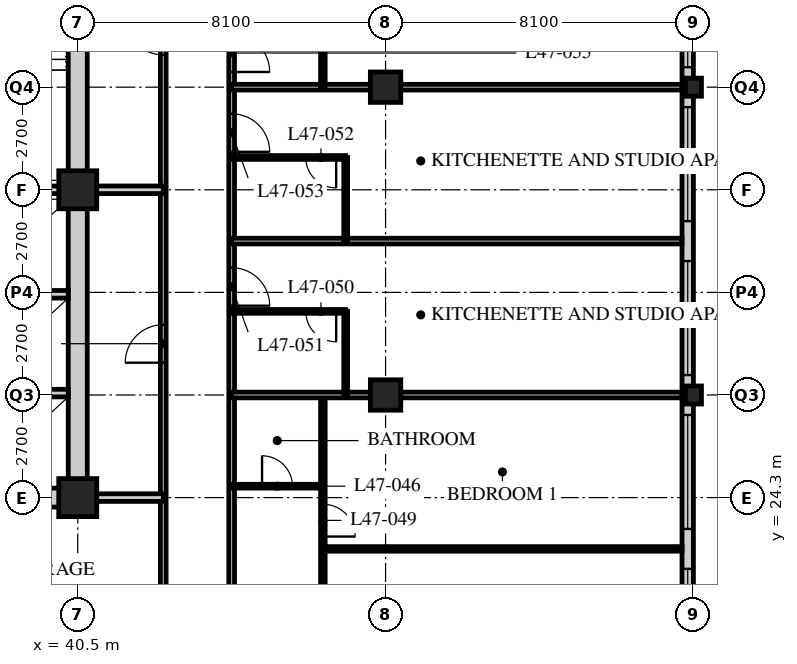
"""IFC4 building model, lengths in metres.
Left out: names, types, materials, properties, quantities, classifications, styles, units other than length and angle.
Written with IfcOpenShell. Run it as: python <this file> out.ifc"""

import sys

from ifc_helpers import new_model, si_unit, direction, frame, frame_2d, origin, origin_2d, place, context, subcontext, project, spatial, rectangle, hollow_rectangle, i_section, extrude, element, fill, save


model = new_model("IFC4")
c1 = context("Model", 3, precision=1e-05, world=origin(), true_north=direction((0.0, 1.0)))
c2 = subcontext(c1, "Body", "Model", "MODEL_VIEW")
j1 = project(units=[si_unit("LENGTHUNIT", "METRE"), si_unit("PLANEANGLEUNIT", "RADIAN")], contexts=[c1])
p1 = place(None, origin())
s1 = spatial("IfcSite", under=j1, at=p1, CompositionType="ELEMENT")
p2 = place(p1, origin())
s2 = spatial("IfcBuilding", under=s1, at=p2, CompositionType="ELEMENT")
p3 = place(p2, frame((0.0, 0.0, 184.8)))
s3 = spatial("IfcBuildingStorey", under=s2, at=p3, CompositionType="ELEMENT", Elevation=184.8)
for number, where, z_axis, x_axis in (
    (1, (40.5, 24.3, 0.0), (0.0, 0.0, 1.0), (1.0, 0.0, 0.0)),
    (2, (40.5, 32.4, 0.0), (0.0, 0.0, 1.0), (1.0, 0.0, 0.0)),
):
    element("IfcColumn", number, at=place(p3, frame(where, z_axis=z_axis, x_axis=x_axis)), inside=s3, PredefinedType="COLUMN", context=c2, shape_type="SweptSolid", body=[
        extrude(hollow_rectangle(XDim=1.0, YDim=1.0, WallThickness=0.1, at=origin_2d()), origin(), (0.0, 0.0, 1.0), 3.6),
    ])
for number, where, z_axis, x_axis in (
    (3, (48.6, 27.0, 0.0), (0.0, 0.0, 1.0), (1.0, 0.0, 0.0)),
    (4, (48.6, 35.1, 0.0), (0.0, 0.0, 1.0), (1.0, 0.0, 0.0)),
):
    element("IfcColumn", number, at=place(p3, frame(where, z_axis=z_axis, x_axis=x_axis)), inside=s3, PredefinedType="COLUMN", context=c2, shape_type="SweptSolid", body=[
        extrude(hollow_rectangle(XDim=0.8, YDim=0.8, WallThickness=0.08, at=origin_2d()), origin(), (0.0, 0.0, 1.0), 3.6),
    ])
for number, where, z_axis, x_axis in (
    (5, (56.7, 27.0, 0.0), (0.0, 0.0, 1.0), (1.0, 0.0, 0.0)),
    (6, (56.7, 35.1, 0.0), (0.0, 0.0, 1.0), (1.0, 0.0, 0.0)),
):
    element("IfcColumn", number, at=place(p3, frame(where, z_axis=z_axis, x_axis=x_axis)), inside=s3, PredefinedType="COLUMN", context=c2, shape_type="SweptSolid", body=[
        extrude(i_section(OverallWidth=0.424, OverallDepth=0.475, WebThickness=0.048, FlangeThickness=0.077, FilletRadius=0.015, at=origin_2d()), origin(), (0.0, 0.0, 1.0), 3.6),
    ])
p4 = place(p3, frame((56.55, 19.2, 0.0), z_axis=(0.0, 0.0, 1.0), x_axis=(0.0, 1.0, 0.0)))
e7 = element("IfcWall", 7, at=p4, inside=s3, PredefinedType="SOLIDWALL", context=c2, shape_type="SweptSolid", body=[
    extrude(rectangle(XDim=32.1, YDim=0.3, at=frame_2d((16.05, 0.0))), origin(), (0.0, 0.0, 1.0), 3.39),
])
p5 = place(p4, frame((0.225, 0.0, 0.6)))
e8 = element("IfcOpeningElement", 8, at=p5, cuts=e7, PredefinedType="OPENING", context=c2, shape_type="SweptSolid", body=[
    extrude(rectangle(XDim=3.0, YDim=2.4, at=frame_2d((1.5, 1.2))), frame((0.0, 0.16, 0.0), z_axis=(0.0, -1.0, 0.0), x_axis=(1.0, 0.0, 0.0)), (0.0, 0.0, 1.0), 0.32),
])
p6 = place(p4, frame((4.275, 0.0, 0.6)))
e9 = element("IfcOpeningElement", 9, at=p6, cuts=e7, PredefinedType="OPENING", context=c2, shape_type="SweptSolid", body=[
    extrude(rectangle(XDim=3.0, YDim=2.4, at=frame_2d((1.5, 1.2))), frame((0.0, 0.16, 0.0), z_axis=(0.0, -1.0, 0.0), x_axis=(1.0, 0.0, 0.0)), (0.0, 0.0, 1.0), 0.32),
])
p7 = place(p4, frame((8.325, 0.0, 0.6)))
e10 = element("IfcOpeningElement", 10, at=p7, cuts=e7, PredefinedType="OPENING", context=c2, shape_type="SweptSolid", body=[
    extrude(rectangle(XDim=3.0, YDim=2.4, at=frame_2d((1.5, 1.2))), frame((0.0, 0.16, 0.0), z_axis=(0.0, -1.0, 0.0), x_axis=(1.0, 0.0, 0.0)), (0.0, 0.0, 1.0), 0.32),
])
p8 = place(p4, frame((12.375, 0.0, 0.6)))
e11 = element("IfcOpeningElement", 11, at=p8, cuts=e7, PredefinedType="OPENING", context=c2, shape_type="SweptSolid", body=[
    extrude(rectangle(XDim=3.0, YDim=2.4, at=frame_2d((1.5, 1.2))), frame((0.0, 0.16, 0.0), z_axis=(0.0, -1.0, 0.0), x_axis=(1.0, 0.0, 0.0)), (0.0, 0.0, 1.0), 0.32),
])
p9 = place(p4, frame((16.425, 0.0, 0.6)))
e12 = element("IfcOpeningElement", 12, at=p9, cuts=e7, PredefinedType="OPENING", context=c2, shape_type="SweptSolid", body=[
    extrude(rectangle(XDim=3.0, YDim=2.4, at=frame_2d((1.5, 1.2))), frame((0.0, 0.16, 0.0), z_axis=(0.0, -1.0, 0.0), x_axis=(1.0, 0.0, 0.0)), (0.0, 0.0, 1.0), 0.32),
])
p10 = place(p4, frame((20.475, 0.0, 0.6)))
e13 = element("IfcOpeningElement", 13, at=p10, cuts=e7, PredefinedType="OPENING", context=c2, shape_type="SweptSolid", body=[
    extrude(rectangle(XDim=3.0, YDim=2.4, at=frame_2d((1.5, 1.2))), frame((0.0, 0.16, 0.0), z_axis=(0.0, -1.0, 0.0), x_axis=(1.0, 0.0, 0.0)), (0.0, 0.0, 1.0), 0.32),
])
p11 = place(p4, frame((24.525, 0.0, 0.6)))
e14 = element("IfcOpeningElement", 14, at=p11, cuts=e7, PredefinedType="OPENING", context=c2, shape_type="SweptSolid", body=[
    extrude(rectangle(XDim=3.0, YDim=2.4, at=frame_2d((1.5, 1.2))), frame((0.0, 0.16, 0.0), z_axis=(0.0, -1.0, 0.0), x_axis=(1.0, 0.0, 0.0)), (0.0, 0.0, 1.0), 0.32),
])
p12 = place(p4, frame((28.575, 0.0, 0.6)))
e15 = element("IfcOpeningElement", 15, at=p12, cuts=e7, PredefinedType="OPENING", context=c2, shape_type="SweptSolid", body=[
    extrude(rectangle(XDim=3.0, YDim=2.4, at=frame_2d((1.5, 1.2))), frame((0.0, 0.16, 0.0), z_axis=(0.0, -1.0, 0.0), x_axis=(1.0, 0.0, 0.0)), (0.0, 0.0, 1.0), 0.32),
])
p13 = place(p3, frame((44.55, 18.9, 0.0), z_axis=(0.0, 0.0, 1.0), x_axis=(0.0, 1.0, 0.0)))
e16 = element("IfcWall", 16, at=p13, inside=s3, PredefinedType="PARTITIONING", context=c2, shape_type="SweptSolid", body=[
    extrude(rectangle(XDim=28.35, YDim=0.15, at=frame_2d((14.175, 0.0))), origin(), (0.0, 0.0, 1.0), 3.39),
])
p14 = place(p13, frame((0.4, 0.0, 0.0)))
e17 = element("IfcOpeningElement", 17, at=p14, cuts=e16, PredefinedType="OPENING", context=c2, shape_type="SweptSolid", body=[
    extrude(rectangle(XDim=1.0, YDim=2.1, at=frame_2d((0.5, 1.05))), frame((0.0, 0.085, 0.0), z_axis=(0.0, -1.0, 0.0), x_axis=(1.0, 0.0, 0.0)), (0.0, 0.0, 1.0), 0.17),
])
p15 = place(p13, frame((10.45, 0.0, 0.0)))
e18 = element("IfcOpeningElement", 18, at=p15, cuts=e16, PredefinedType="OPENING", context=c2, shape_type="SweptSolid", body=[
    extrude(rectangle(XDim=1.0, YDim=2.1, at=frame_2d((0.5, 1.05))), frame((0.0, 0.085, 0.0), z_axis=(0.0, -1.0, 0.0), x_axis=(1.0, 0.0, 0.0)), (0.0, 0.0, 1.0), 0.17),
])
p16 = place(p13, frame((14.5, 0.0, 0.0)))
e19 = element("IfcOpeningElement", 19, at=p16, cuts=e16, PredefinedType="OPENING", context=c2, shape_type="SweptSolid", body=[
    extrude(rectangle(XDim=1.0, YDim=2.1, at=frame_2d((0.5, 1.05))), frame((0.0, 0.085, 0.0), z_axis=(0.0, -1.0, 0.0), x_axis=(1.0, 0.0, 0.0)), (0.0, 0.0, 1.0), 0.17),
])
p17 = place(p13, frame((16.6, 0.0, 0.0)))
e20 = element("IfcOpeningElement", 20, at=p17, cuts=e16, PredefinedType="OPENING", context=c2, shape_type="SweptSolid", body=[
    extrude(rectangle(XDim=1.0, YDim=2.1, at=frame_2d((0.5, 1.05))), frame((0.0, 0.085, 0.0), z_axis=(0.0, -1.0, 0.0), x_axis=(1.0, 0.0, 0.0)), (0.0, 0.0, 1.0), 0.17),
])
p18 = place(p13, frame((26.65, 0.0, 0.0)))
e21 = element("IfcOpeningElement", 21, at=p18, cuts=e16, PredefinedType="OPENING", context=c2, shape_type="SweptSolid", body=[
    extrude(rectangle(XDim=1.0, YDim=2.1, at=frame_2d((0.5, 1.05))), frame((0.0, 0.085, 0.0), z_axis=(0.0, -1.0, 0.0), x_axis=(1.0, 0.0, 0.0)), (0.0, 0.0, 1.0), 0.17),
])
p19 = place(p3, frame((42.75, 20.7, 0.0), z_axis=(0.0, 0.0, 1.0), x_axis=(0.0, 1.0, 0.0)))
e22 = element("IfcWall", 22, at=p19, inside=s3, PredefinedType="PARTITIONING", context=c2, shape_type="SweptSolid", body=[
    extrude(rectangle(XDim=24.75, YDim=0.15, at=frame_2d((12.375, 0.0))), origin(), (0.0, 0.0, 1.0), 3.39),
])
p20 = place(p19, frame((7.15, 0.0, 0.0)))
e23 = element("IfcOpeningElement", 23, at=p20, cuts=e22, PredefinedType="OPENING", context=c2, shape_type="SweptSolid", body=[
    extrude(rectangle(XDim=1.0, YDim=2.1, at=frame_2d((0.5, 1.05))), frame((0.0, 0.085, 0.0), z_axis=(0.0, -1.0, 0.0), x_axis=(1.0, 0.0, 0.0)), (0.0, 0.0, 1.0), 0.17),
])
p21 = place(p19, frame((15.25, 0.0, 0.0)))
e24 = element("IfcOpeningElement", 24, at=p21, cuts=e22, PredefinedType="OPENING", context=c2, shape_type="SweptSolid", body=[
    extrude(rectangle(XDim=1.0, YDim=2.1, at=frame_2d((0.5, 1.05))), frame((0.0, 0.085, 0.0), z_axis=(0.0, -1.0, 0.0), x_axis=(1.0, 0.0, 0.0)), (0.0, 0.0, 1.0), 0.17),
])
for number, where, z_axis, x_axis in (
    (25, (40.5, 32.4, 0.0), (0.0, 0.0, 1.0), (1.0, 0.0, 0.0)),
    (26, (40.5, 24.3, 0.0), (0.0, 0.0, 1.0), (1.0, 0.0, 0.0)),
):
    element("IfcWall", number, at=place(p3, frame(where, z_axis=z_axis, x_axis=x_axis)), inside=s3, PredefinedType="SOLIDWALL", context=c2, shape_type="SweptSolid", body=[
        extrude(rectangle(XDim=2.25, YDim=0.2, at=frame_2d((1.125, 0.0))), origin(), (0.0, 0.0, 1.0), 3.39),
    ])
p22 = place(p3, frame((46.95, 18.9, 0.0), z_axis=(0.0, 0.0, 1.0), x_axis=(0.0, 1.0, 0.0)))
e27 = element("IfcWall", 27, at=p22, inside=s3, PredefinedType="PARTITIONING", context=c2, shape_type="SweptSolid", body=[
    extrude(rectangle(XDim=8.1, YDim=0.12, at=frame_2d((4.05, 0.0))), origin(), (0.0, 0.0, 1.0), 3.39),
])
p23 = place(p22, frame((0.975, 0.0, 0.0)))
e28 = element("IfcOpeningElement", 28, at=p23, cuts=e27, PredefinedType="OPENING", context=c2, shape_type="SweptSolid", body=[
    extrude(rectangle(XDim=0.85, YDim=2.1, at=frame_2d((0.425, 1.05))), frame((0.0, 0.07, 0.0), z_axis=(0.0, -1.0, 0.0), x_axis=(1.0, 0.0, 0.0)), (0.0, 0.0, 1.0), 0.14),
])
p24 = place(p22, frame((4.375, 0.0, 0.0)))
e29 = element("IfcOpeningElement", 29, at=p24, cuts=e27, PredefinedType="OPENING", context=c2, shape_type="SweptSolid", body=[
    extrude(rectangle(XDim=0.85, YDim=2.1, at=frame_2d((0.425, 1.05))), frame((0.0, 0.07, 0.0), z_axis=(0.0, -1.0, 0.0), x_axis=(1.0, 0.0, 0.0)), (0.0, 0.0, 1.0), 0.14),
])
p25 = place(p3, frame((44.55, 24.6, 0.0), z_axis=(0.0, 0.0, 1.0), x_axis=(1.0, 0.0, 0.0)))
e30 = element("IfcWall", 30, at=p25, inside=s3, PredefinedType="PARTITIONING", context=c2, shape_type="SweptSolid", body=[
    extrude(rectangle(XDim=2.4, YDim=0.1, at=frame_2d((1.2, 0.0))), origin(), (0.0, 0.0, 1.0), 3.39),
])
p26 = place(p25, frame((0.8, 0.0, 0.0)))
e31 = element("IfcOpeningElement", 31, at=p26, cuts=e30, PredefinedType="OPENING", context=c2, shape_type="SweptSolid", body=[
    extrude(rectangle(XDim=0.8, YDim=2.1, at=frame_2d((0.4, 1.05))), frame((0.0, 0.06, 0.0), z_axis=(0.0, -1.0, 0.0), x_axis=(1.0, 0.0, 0.0)), (0.0, 0.0, 1.0), 0.12),
])
p27 = place(p3, frame((46.95, 22.95, 0.0), z_axis=(0.0, 0.0, 1.0), x_axis=(1.0, 0.0, 0.0)))
e32 = element("IfcWall", 32, at=p27, inside=s3, PredefinedType="PARTITIONING", context=c2, shape_type="SweptSolid", body=[
    extrude(rectangle(XDim=9.45, YDim=0.12, at=frame_2d((4.725, 0.0))), origin(), (0.0, 0.0, 1.0), 3.39),
])
p28 = place(p3, frame((44.55, 27.0, 0.0), z_axis=(0.0, 0.0, 1.0), x_axis=(1.0, 0.0, 0.0)))
e33 = element("IfcWall", 33, at=p28, inside=s3, PredefinedType="PARTITIONING", context=c2, shape_type="SweptSolid", body=[
    extrude(rectangle(XDim=11.85, YDim=0.15, at=frame_2d((5.925, 0.0))), origin(), (0.0, 0.0, 1.0), 2.778),
])
p29 = place(p3, frame((47.55, 27.0, 0.0), z_axis=(0.0, 0.0, 1.0), x_axis=(0.0, 1.0, 0.0)))
e34 = element("IfcWall", 34, at=p29, inside=s3, PredefinedType="PARTITIONING", context=c2, shape_type="SweptSolid", body=[
    extrude(rectangle(XDim=2.2, YDim=0.1, at=frame_2d((1.1, 0.0))), origin(), (0.0, 0.0, 1.0), 3.39),
])
p30 = place(p3, frame((44.55, 29.2, 0.0), z_axis=(0.0, 0.0, 1.0), x_axis=(1.0, 0.0, 0.0)))
e35 = element("IfcWall", 35, at=p30, inside=s3, PredefinedType="PARTITIONING", context=c2, shape_type="SweptSolid", body=[
    extrude(rectangle(XDim=3.0, YDim=0.1, at=frame_2d((1.5, 0.0))), origin(), (0.0, 0.0, 1.0), 3.39),
])
p31 = place(p30, frame((1.95, 0.0, 0.0)))
e36 = element("IfcOpeningElement", 36, at=p31, cuts=e35, PredefinedType="OPENING", context=c2, shape_type="SweptSolid", body=[
    extrude(rectangle(XDim=0.8, YDim=2.1, at=frame_2d((0.4, 1.05))), frame((0.0, 0.06, 0.0), z_axis=(0.0, -1.0, 0.0), x_axis=(1.0, 0.0, 0.0)), (0.0, 0.0, 1.0), 0.12),
])
p32 = place(p3, frame((44.55, 31.05, 0.0), z_axis=(0.0, 0.0, 1.0), x_axis=(1.0, 0.0, 0.0)))
e37 = element("IfcWall", 37, at=p32, inside=s3, PredefinedType="PARTITIONING", context=c2, shape_type="SweptSolid", body=[
    extrude(rectangle(XDim=11.85, YDim=0.15, at=frame_2d((5.925, 0.0))), origin(), (0.0, 0.0, 1.0), 3.39),
])
p33 = place(p3, frame((47.55, 31.05, 0.0), z_axis=(0.0, 0.0, 1.0), x_axis=(0.0, 1.0, 0.0)))
e38 = element("IfcWall", 38, at=p33, inside=s3, PredefinedType="PARTITIONING", context=c2, shape_type="SweptSolid", body=[
    extrude(rectangle(XDim=2.2, YDim=0.1, at=frame_2d((1.1, 0.0))), origin(), (0.0, 0.0, 1.0), 3.39),
])
p34 = place(p3, frame((44.55, 33.25, 0.0), z_axis=(0.0, 0.0, 1.0), x_axis=(1.0, 0.0, 0.0)))
e39 = element("IfcWall", 39, at=p34, inside=s3, PredefinedType="PARTITIONING", context=c2, shape_type="SweptSolid", body=[
    extrude(rectangle(XDim=3.0, YDim=0.1, at=frame_2d((1.5, 0.0))), origin(), (0.0, 0.0, 1.0), 3.39),
])
p35 = place(p34, frame((1.95, 0.0, 0.0)))
e40 = element("IfcOpeningElement", 40, at=p35, cuts=e39, PredefinedType="OPENING", context=c2, shape_type="SweptSolid", body=[
    extrude(rectangle(XDim=0.8, YDim=2.1, at=frame_2d((0.4, 1.05))), frame((0.0, 0.06, 0.0), z_axis=(0.0, -1.0, 0.0), x_axis=(1.0, 0.0, 0.0)), (0.0, 0.0, 1.0), 0.12),
])
p36 = place(p3, frame((44.55, 35.1, 0.0), z_axis=(0.0, 0.0, 1.0), x_axis=(1.0, 0.0, 0.0)))
e41 = element("IfcWall", 41, at=p36, inside=s3, PredefinedType="PARTITIONING", context=c2, shape_type="SweptSolid", body=[
    extrude(rectangle(XDim=11.85, YDim=0.15, at=frame_2d((5.925, 0.0))), origin(), (0.0, 0.0, 1.0), 2.778),
])
p37 = place(p3, frame((46.95, 35.1, 0.0), z_axis=(0.0, 0.0, 1.0), x_axis=(0.0, 1.0, 0.0)))
e42 = element("IfcWall", 42, at=p37, inside=s3, PredefinedType="PARTITIONING", context=c2, shape_type="SweptSolid", body=[
    extrude(rectangle(XDim=8.1, YDim=0.12, at=frame_2d((4.05, 0.0))), origin(), (0.0, 0.0, 1.0), 3.39),
])
p38 = place(p37, frame((0.975, 0.0, 0.0)))
e43 = element("IfcOpeningElement", 43, at=p38, cuts=e42, PredefinedType="OPENING", context=c2, shape_type="SweptSolid", body=[
    extrude(rectangle(XDim=0.85, YDim=2.1, at=frame_2d((0.425, 1.05))), frame((0.0, 0.07, 0.0), z_axis=(0.0, -1.0, 0.0), x_axis=(1.0, 0.0, 0.0)), (0.0, 0.0, 1.0), 0.14),
])
p39 = place(p37, frame((4.375, 0.0, 0.0)))
e44 = element("IfcOpeningElement", 44, at=p39, cuts=e42, PredefinedType="OPENING", context=c2, shape_type="SweptSolid", body=[
    extrude(rectangle(XDim=0.85, YDim=2.1, at=frame_2d((0.425, 1.05))), frame((0.0, 0.07, 0.0), z_axis=(0.0, -1.0, 0.0), x_axis=(1.0, 0.0, 0.0)), (0.0, 0.0, 1.0), 0.14),
])
p40 = place(p3, frame((15.95, 24.3, 0.0), z_axis=(0.0, 0.0, 1.0), x_axis=(1.0, 0.0, 0.0)))
e45 = element("IfcWall", 45, at=p40, inside=s3, PredefinedType="SOLIDWALL", context=c2, shape_type="SweptSolid", body=[
    extrude(rectangle(XDim=24.8, YDim=0.5, at=frame_2d((12.4, 0.0))), origin(), (0.0, 0.0, 1.0), 2.74),
])
p41 = place(p40, frame((11.5, 0.0, 0.0)))
e46 = element("IfcOpeningElement", 46, at=p41, cuts=e45, PredefinedType="OPENING", context=c2, shape_type="SweptSolid", body=[
    extrude(rectangle(XDim=1.8, YDim=2.4, at=frame_2d((0.9, 1.2))), frame((0.0, 0.26, 0.0), z_axis=(0.0, -1.0, 0.0), x_axis=(1.0, 0.0, 0.0)), (0.0, 0.0, 1.0), 0.52),
])
p42 = place(p3, frame((40.5, 24.55, 0.0), z_axis=(0.0, 0.0, 1.0), x_axis=(0.0, 1.0, 0.0)))
e47 = element("IfcWall", 47, at=p42, inside=s3, PredefinedType="SOLIDWALL", context=c2, shape_type="SweptSolid", body=[
    extrude(rectangle(XDim=15.7, YDim=0.5, at=frame_2d((7.85, 0.0))), origin(), (0.0, 0.0, 1.0), 2.778),
])
p43 = place(p3, frame((32.3, 32.4, 0.0), z_axis=(0.0, 0.0, 1.0), x_axis=(1.0, 0.0, 0.0)))
e48 = element("IfcWall", 48, at=p43, inside=s3, PredefinedType="SOLIDWALL", context=c2, shape_type="SweptSolid", body=[
    extrude(rectangle(XDim=7.95, YDim=0.2, at=frame_2d((3.975, 0.0))), origin(), (0.0, 0.0, 1.0), 2.778),
])
for number, where, z_axis, x_axis in (
    (49, (37.65, 27.05, 0.0), (0.0, 0.0, 1.0), (1.0, 0.0, 0.0)),
    (50, (37.65, 29.65, 0.0), (0.0, 0.0, 1.0), (1.0, 0.0, 0.0)),
):
    element("IfcWall", number, at=place(p3, frame(where, z_axis=z_axis, x_axis=x_axis)), inside=s3, PredefinedType="SOLIDWALL", context=c2, shape_type="SweptSolid", body=[
        extrude(rectangle(XDim=2.6, YDim=0.2, at=frame_2d((1.3, 0.0))), origin(), (0.0, 0.0, 1.0), 3.39),
    ])
p44 = place(p5, origin())
e51 = element("IfcWindow", 51, at=p44, inside=s3, PartitioningType="SINGLE_PANEL", PredefinedType="WINDOW", context=c2, shape_type="SweptSolid", body=[
    extrude(rectangle(XDim=3.0, YDim=2.4, at=frame_2d((1.5, 1.2))), frame((0.0, 0.03, 0.0), z_axis=(0.0, -1.0, 0.0), x_axis=(1.0, 0.0, 0.0)), (0.0, 0.0, 1.0), 0.06),
])
fill(e8, e51)
p45 = place(p6, origin())
e52 = element("IfcWindow", 52, at=p45, inside=s3, PartitioningType="SINGLE_PANEL", PredefinedType="WINDOW", context=c2, shape_type="SweptSolid", body=[
    extrude(rectangle(XDim=3.0, YDim=2.4, at=frame_2d((1.5, 1.2))), frame((0.0, 0.03, 0.0), z_axis=(0.0, -1.0, 0.0), x_axis=(1.0, 0.0, 0.0)), (0.0, 0.0, 1.0), 0.06),
])
fill(e9, e52)
p46 = place(p7, origin())
e53 = element("IfcWindow", 53, at=p46, inside=s3, PartitioningType="SINGLE_PANEL", PredefinedType="WINDOW", context=c2, shape_type="SweptSolid", body=[
    extrude(rectangle(XDim=3.0, YDim=2.4, at=frame_2d((1.5, 1.2))), frame((0.0, 0.03, 0.0), z_axis=(0.0, -1.0, 0.0), x_axis=(1.0, 0.0, 0.0)), (0.0, 0.0, 1.0), 0.06),
])
fill(e10, e53)
p47 = place(p8, origin())
e54 = element("IfcWindow", 54, at=p47, inside=s3, PartitioningType="SINGLE_PANEL", PredefinedType="WINDOW", context=c2, shape_type="SweptSolid", body=[
    extrude(rectangle(XDim=3.0, YDim=2.4, at=frame_2d((1.5, 1.2))), frame((0.0, 0.03, 0.0), z_axis=(0.0, -1.0, 0.0), x_axis=(1.0, 0.0, 0.0)), (0.0, 0.0, 1.0), 0.06),
])
fill(e11, e54)
p48 = place(p9, origin())
e55 = element("IfcWindow", 55, at=p48, inside=s3, PartitioningType="SINGLE_PANEL", PredefinedType="WINDOW", context=c2, shape_type="SweptSolid", body=[
    extrude(rectangle(XDim=3.0, YDim=2.4, at=frame_2d((1.5, 1.2))), frame((0.0, 0.03, 0.0), z_axis=(0.0, -1.0, 0.0), x_axis=(1.0, 0.0, 0.0)), (0.0, 0.0, 1.0), 0.06),
])
fill(e12, e55)
p49 = place(p20, origin())
e56 = element("IfcDoor", 56, at=p49, inside=s3, OperationType="SINGLE_SWING_LEFT", PredefinedType="DOOR", context=c2, shape_type="SweptSolid", body=[
    extrude(rectangle(XDim=1.0, YDim=2.1, at=frame_2d((0.5, 1.05))), frame((0.0, 0.025, 0.0), z_axis=(0.0, -1.0, 0.0), x_axis=(1.0, 0.0, 0.0)), (0.0, 0.0, 1.0), 0.05),
])
fill(e23, e56)
p50 = place(p21, origin())
e57 = element("IfcDoor", 57, at=p50, inside=s3, OperationType="SINGLE_SWING_RIGHT", PredefinedType="DOOR", context=c2, shape_type="SweptSolid", body=[
    extrude(rectangle(XDim=1.0, YDim=2.1, at=frame_2d((0.5, 1.05))), frame((0.0, 0.025, 0.0), z_axis=(0.0, -1.0, 0.0), x_axis=(1.0, 0.0, 0.0)), (0.0, 0.0, 1.0), 0.05),
])
fill(e24, e57)
p51 = place(p26, origin())
e58 = element("IfcDoor", 58, at=p51, inside=s3, OperationType="SINGLE_SWING_LEFT", PredefinedType="DOOR", context=c2, shape_type="SweptSolid", body=[
    extrude(rectangle(XDim=0.8, YDim=2.1, at=frame_2d((0.4, 1.05))), frame((0.0, 0.025, 0.0), z_axis=(0.0, -1.0, 0.0), x_axis=(1.0, 0.0, 0.0)), (0.0, 0.0, 1.0), 0.05),
])
fill(e31, e58)
p52 = place(p24, origin())
e59 = element("IfcDoor", 59, at=p52, inside=s3, OperationType="SINGLE_SWING_RIGHT", PredefinedType="DOOR", context=c2, shape_type="SweptSolid", body=[
    extrude(rectangle(XDim=0.85, YDim=2.1, at=frame_2d((0.425, 1.05))), frame((0.0, 0.025, 0.0), z_axis=(0.0, -1.0, 0.0), x_axis=(1.0, 0.0, 0.0)), (0.0, 0.0, 1.0), 0.05),
])
fill(e29, e59)
p53 = place(p31, origin())
e60 = element("IfcDoor", 60, at=p53, inside=s3, OperationType="SINGLE_SWING_LEFT", PredefinedType="DOOR", context=c2, shape_type="SweptSolid", body=[
    extrude(rectangle(XDim=0.8, YDim=2.1, at=frame_2d((0.4, 1.05))), frame((0.0, 0.025, 0.0), z_axis=(0.0, -1.0, 0.0), x_axis=(1.0, 0.0, 0.0)), (0.0, 0.0, 1.0), 0.05),
])
fill(e36, e60)
p54 = place(p15, origin())
e61 = element("IfcDoor", 61, at=p54, inside=s3, OperationType="SINGLE_SWING_RIGHT", PredefinedType="DOOR", context=c2, shape_type="SweptSolid", body=[
    extrude(rectangle(XDim=1.0, YDim=2.1, at=frame_2d((0.5, 1.05))), frame((0.0, 0.025, 0.0), z_axis=(0.0, -1.0, 0.0), x_axis=(1.0, 0.0, 0.0)), (0.0, 0.0, 1.0), 0.05),
])
fill(e18, e61)
p55 = place(p35, origin())
e62 = element("IfcDoor", 62, at=p55, inside=s3, OperationType="SINGLE_SWING_LEFT", PredefinedType="DOOR", context=c2, shape_type="SweptSolid", body=[
    extrude(rectangle(XDim=0.8, YDim=2.1, at=frame_2d((0.4, 1.05))), frame((0.0, 0.025, 0.0), z_axis=(0.0, -1.0, 0.0), x_axis=(1.0, 0.0, 0.0)), (0.0, 0.0, 1.0), 0.05),
])
fill(e40, e62)
p56 = place(p16, origin())
e63 = element("IfcDoor", 63, at=p56, inside=s3, OperationType="SINGLE_SWING_RIGHT", PredefinedType="DOOR", context=c2, shape_type="SweptSolid", body=[
    extrude(rectangle(XDim=1.0, YDim=2.1, at=frame_2d((0.5, 1.05))), frame((0.0, 0.025, 0.0), z_axis=(0.0, -1.0, 0.0), x_axis=(1.0, 0.0, 0.0)), (0.0, 0.0, 1.0), 0.05),
])
fill(e19, e63)
p57 = place(p17, origin())
e64 = element("IfcDoor", 64, at=p57, inside=s3, OperationType="SINGLE_SWING_RIGHT", PredefinedType="DOOR", context=c2, shape_type="SweptSolid", body=[
    extrude(rectangle(XDim=1.0, YDim=2.1, at=frame_2d((0.5, 1.05))), frame((0.0, 0.025, 0.0), z_axis=(0.0, -1.0, 0.0), x_axis=(1.0, 0.0, 0.0)), (0.0, 0.0, 1.0), 0.05),
])
fill(e20, e64)
save(model, sys.argv[1])
